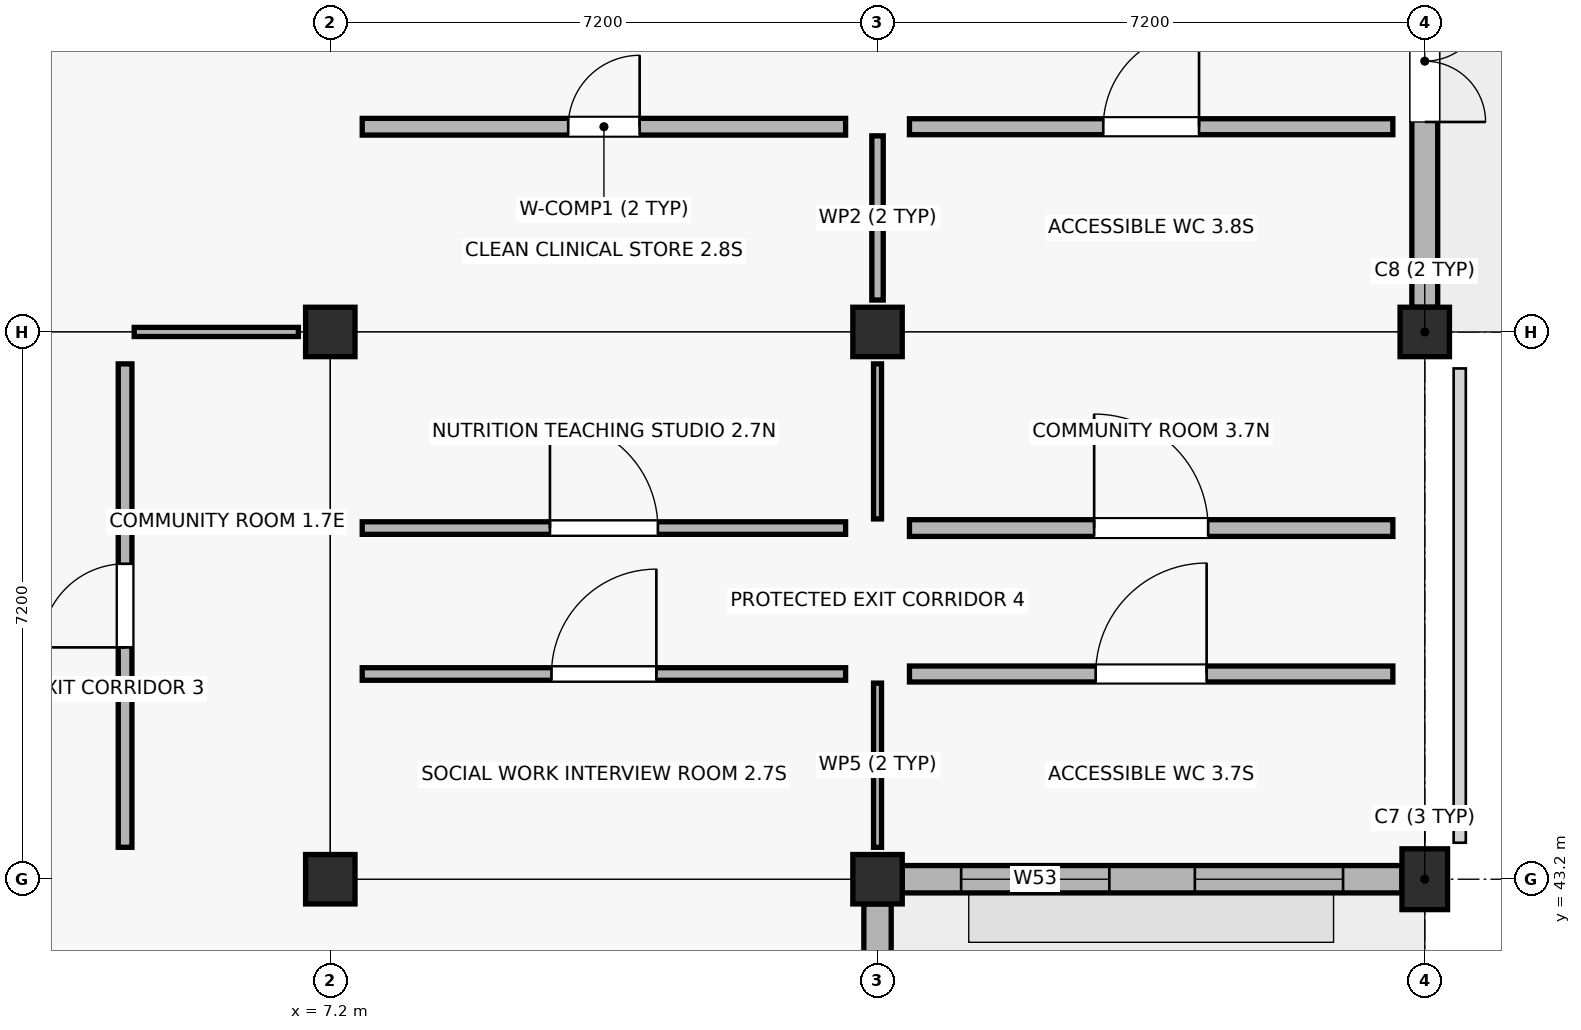
"""IFC4 building model, lengths in metres.
Left out: names, types, materials, properties, quantities, classifications, styles, units other than length and angle.
Written with IfcOpenShell. Run it as: python <this file> out.ifc"""

import sys

from ifc_helpers import new_model, si_unit, direction, frame, frame_2d, origin, origin_2d, place, context, subcontext, project, spatial, rectangle, circle, extrude, element, fill, save


model = new_model("IFC4")
c1 = context("Model", 3, precision=1e-05, world=origin(), true_north=direction((0.0, 1.0)))
c2 = subcontext(c1, "Body", "Model", "MODEL_VIEW")
j1 = project(units=[si_unit("LENGTHUNIT", "METRE"), si_unit("PLANEANGLEUNIT", "RADIAN")], contexts=[c1])
p1 = place(None, origin())
s1 = spatial("IfcSite", under=j1, at=p1, CompositionType="ELEMENT")
p2 = place(p1, origin())
s2 = spatial("IfcBuilding", under=s1, at=p2, CompositionType="ELEMENT")
p3 = place(p2, origin())
s3 = spatial("IfcBuildingStorey", under=s2, at=p3, CompositionType="ELEMENT", Elevation=0.0)
for number, where, z_axis, x_axis in (
    (1, (7.2, 43.2, -0.25), (0.0, 0.0, 1.0), (1.0, 0.0, 0.0)),
    (2, (7.2, 50.4, -0.25), (0.0, 0.0, 1.0), (1.0, 0.0, 0.0)),
    (3, (14.4, 43.2, -0.25), (0.0, 0.0, 1.0), (1.0, 0.0, 0.0)),
    (4, (14.4, 50.4, -0.25), (0.0, 0.0, 1.0), (1.0, 0.0, 0.0)),
):
    element("IfcColumn", number, at=place(p3, frame(where, z_axis=z_axis, x_axis=x_axis)), inside=s3, PredefinedType="COLUMN", context=c2, shape_type="SweptSolid", body=[
        extrude(rectangle(XDim=0.65, YDim=0.65, at=origin_2d()), origin(), (0.0, 0.0, 1.0), 4.75),
    ])
p4 = place(p3, frame((21.6, 43.2, -0.25), z_axis=(0.0, 0.0, 1.0), x_axis=(1.0, 0.0, 0.0)))
e5 = element("IfcColumn", 5, at=p4, inside=s3, PredefinedType="PILASTER", context=c2, shape_type="SweptSolid", body=[
    extrude(rectangle(XDim=0.6, YDim=0.8, at=origin_2d()), origin(), (0.0, 0.0, 1.0), 4.75),
])
p5 = place(p3, frame((21.6, 50.4, -0.25), z_axis=(0.0, 0.0, 1.0), x_axis=(1.0, 0.0, 0.0)))
e6 = element("IfcColumn", 6, at=p5, inside=s3, PredefinedType="COLUMN", context=c2, shape_type="SweptSolid", body=[
    extrude(circle(Radius=0.325, at=origin_2d()), origin(), (0.0, 0.0, 1.0), 4.75),
])
p6 = place(p3, frame((14.4, 36.325, 0.0), z_axis=(0.0, 0.0, 1.0), x_axis=(0.0, 1.0, 0.0)))
e7 = element("IfcWall", 7, at=p6, inside=s3, PredefinedType="SOLIDWALL", context=c2, shape_type="SweptSolid", body=[
    extrude(rectangle(XDim=6.55, YDim=0.36, at=frame_2d((3.275, 0.0))), origin(), (0.0, 0.0, 1.0), 3.52),
])
p7 = place(p6, frame((1.0, 0.0, 0.9)))
e8 = element("IfcOpeningElement", 8, at=p7, cuts=e7, PredefinedType="OPENING", context=c2, shape_type="SweptSolid", body=[
    extrude(rectangle(XDim=1.5, YDim=1.75, at=frame_2d((0.75, 0.875))), frame((0.0, 0.19, 0.0), z_axis=(0.0, -1.0, 0.0), x_axis=(1.0, 0.0, 0.0)), (0.0, 0.0, 1.0), 0.38),
])
p8 = place(p6, frame((4.05, 0.0, 0.9)))
e9 = element("IfcOpeningElement", 9, at=p8, cuts=e7, PredefinedType="OPENING", context=c2, shape_type="SweptSolid", body=[
    extrude(rectangle(XDim=1.5, YDim=1.75, at=frame_2d((0.75, 0.875))), frame((0.0, 0.19, 0.0), z_axis=(0.0, -1.0, 0.0), x_axis=(1.0, 0.0, 0.0)), (0.0, 0.0, 1.0), 0.38),
])
p9 = place(p3, frame((14.725, 43.2, 0.0), z_axis=(0.0, 0.0, 1.0), x_axis=(1.0, 0.0, 0.0)))
e10 = element("IfcWall", 10, at=p9, inside=s3, PredefinedType="SOLIDWALL", context=c2, shape_type="SweptSolid", body=[
    extrude(rectangle(XDim=6.575, YDim=0.36, at=frame_2d((3.288, 0.0))), origin(), (0.0, 0.0, 1.0), 3.47),
])
p10 = place(p9, frame((0.775, 0.0, 0.9)))
e11 = element("IfcOpeningElement", 11, at=p10, cuts=e10, PredefinedType="OPENING", context=c2, shape_type="SweptSolid", body=[
    extrude(rectangle(XDim=1.95, YDim=1.88, at=frame_2d((0.975, 0.94))), frame((0.0, 0.19, 0.0), z_axis=(0.0, -1.0, 0.0), x_axis=(1.0, 0.0, 0.0)), (0.0, 0.0, 1.0), 0.38),
])
p11 = place(p9, frame((3.85, 0.0, 0.9)))
e12 = element("IfcOpeningElement", 12, at=p11, cuts=e10, PredefinedType="OPENING", context=c2, shape_type="SweptSolid", body=[
    extrude(rectangle(XDim=1.95, YDim=1.88, at=frame_2d((0.975, 0.94))), frame((0.0, 0.19, 0.0), z_axis=(0.0, -1.0, 0.0), x_axis=(1.0, 0.0, 0.0)), (0.0, 0.0, 1.0), 0.38),
])
p12 = place(p3, frame((21.6, 57.2, 0.0), z_axis=(0.0, 0.0, 1.0), x_axis=(0.0, -1.0, 0.0)))
e13 = element("IfcWall", 13, at=p12, inside=s3, PredefinedType="SOLIDWALL", context=c2, shape_type="SweptSolid", body=[
    extrude(rectangle(XDim=6.475, YDim=0.34, at=frame_2d((3.237, 0.0))), origin(), (0.0, 0.0, 1.0), 3.52),
])
p13 = place(p12, frame((2.438, 0.0, 0.0)))
e14 = element("IfcOpeningElement", 14, at=p13, cuts=e13, PredefinedType="OPENING", context=c2, shape_type="SweptSolid", body=[
    extrude(rectangle(XDim=1.6, YDim=2.25, at=frame_2d((0.8, 1.125))), frame((0.0, 0.18, 0.0), z_axis=(0.0, -1.0, 0.0), x_axis=(1.0, 0.0, 0.0)), (0.0, 0.0, 1.0), 0.36),
])
p14 = place(p3, frame((7.62, 53.1, 0.0), z_axis=(0.0, 0.0, 1.0), x_axis=(1.0, 0.0, 0.0)))
e15 = element("IfcWall", 15, at=p14, inside=s3, PredefinedType="SOLIDWALL", context=c2, shape_type="SweptSolid", body=[
    extrude(rectangle(XDim=6.36, YDim=0.22, at=frame_2d((3.18, 0.0))), origin(), (0.0, 0.0, 1.0), 3.36),
])
p15 = place(p14, frame((2.71, 0.0, 0.0)))
e16 = element("IfcOpeningElement", 16, at=p15, cuts=e15, PredefinedType="OPENING", context=c2, shape_type="SweptSolid", body=[
    extrude(rectangle(XDim=0.94, YDim=2.09, at=frame_2d((0.47, 1.045))), frame((0.0, 0.12, 0.0), z_axis=(0.0, -1.0, 0.0), x_axis=(1.0, 0.0, 0.0)), (0.0, 0.0, 1.0), 0.24),
])
p16 = place(p3, frame((14.4, 50.82, 0.0), z_axis=(0.0, 0.0, 1.0), x_axis=(0.0, 1.0, 0.0)))
e17 = element("IfcWall", 17, at=p16, inside=s3, PredefinedType="PARTITIONING", context=c2, shape_type="SweptSolid", body=[
    extrude(rectangle(XDim=2.16, YDim=0.15, at=frame_2d((1.08, 0.0))), origin(), (0.0, 0.0, 1.0), 3.36),
])
p17 = place(p3, frame((14.82, 53.1, 0.0), z_axis=(0.0, 0.0, 1.0), x_axis=(1.0, 0.0, 0.0)))
e18 = element("IfcWall", 18, at=p17, inside=s3, PredefinedType="PLUMBINGWALL", context=c2, shape_type="SweptSolid", body=[
    extrude(rectangle(XDim=6.36, YDim=0.21, at=frame_2d((3.18, 0.0))), origin(), (0.0, 0.0, 1.0), 3.36),
])
p18 = place(p17, frame((2.55, 0.0, 0.0)))
e19 = element("IfcOpeningElement", 19, at=p18, cuts=e18, PredefinedType="OPENING", context=c2, shape_type="SweptSolid", body=[
    extrude(rectangle(XDim=1.26, YDim=2.09, at=frame_2d((0.63, 1.045))), frame((0.0, 0.115, 0.0), z_axis=(0.0, -1.0, 0.0), x_axis=(1.0, 0.0, 0.0)), (0.0, 0.0, 1.0), 0.23),
])
p19 = place(p3, frame((4.5, 43.62, 0.0), z_axis=(0.0, 0.0, 1.0), x_axis=(0.0, 1.0, 0.0)))
e20 = element("IfcWall", 20, at=p19, inside=s3, PredefinedType="PARTITIONING", context=c2, shape_type="SweptSolid", body=[
    extrude(rectangle(XDim=6.36, YDim=0.18, at=frame_2d((3.18, 0.0))), origin(), (0.0, 0.0, 1.0), 3.36),
])
p20 = place(p19, frame((2.63, 0.0, 0.0)))
e21 = element("IfcOpeningElement", 21, at=p20, cuts=e20, PredefinedType="OPENING", context=c2, shape_type="SweptSolid", body=[
    extrude(rectangle(XDim=1.1, YDim=2.09, at=frame_2d((0.55, 1.045))), frame((0.0, 0.1, 0.0), z_axis=(0.0, -1.0, 0.0), x_axis=(1.0, 0.0, 0.0)), (0.0, 0.0, 1.0), 0.2),
])
p21 = place(p3, frame((4.62, 50.4, 0.0), z_axis=(0.0, 0.0, 1.0), x_axis=(1.0, 0.0, 0.0)))
e22 = element("IfcWall", 22, at=p21, inside=s3, PredefinedType="PARTITIONING", context=c2, shape_type="SweptSolid", body=[
    extrude(rectangle(XDim=2.16, YDim=0.12, at=frame_2d((1.08, 0.0))), origin(), (0.0, 0.0, 1.0), 3.36),
])
p22 = place(p3, frame((7.62, 45.9, 0.0), z_axis=(0.0, 0.0, 1.0), x_axis=(1.0, 0.0, 0.0)))
e23 = element("IfcWall", 23, at=p22, inside=s3, PredefinedType="PARTITIONING", context=c2, shape_type="SweptSolid", body=[
    extrude(rectangle(XDim=6.36, YDim=0.165, at=frame_2d((3.18, 0.0))), origin(), (0.0, 0.0, 1.0), 3.36),
])
p23 = place(p22, frame((2.49, 0.0, 0.0)))
e24 = element("IfcOpeningElement", 24, at=p23, cuts=e23, PredefinedType="OPENING", context=c2, shape_type="SweptSolid", body=[
    extrude(rectangle(XDim=1.38, YDim=2.09, at=frame_2d((0.69, 1.045))), frame((0.0, 0.093, 0.0), z_axis=(0.0, -1.0, 0.0), x_axis=(1.0, 0.0, 0.0)), (0.0, 0.0, 1.0), 0.185),
])
p24 = place(p3, frame((14.4, 43.62, 0.0), z_axis=(0.0, 0.0, 1.0), x_axis=(0.0, 1.0, 0.0)))
e25 = element("IfcWall", 25, at=p24, inside=s3, PredefinedType="PARTITIONING", context=c2, shape_type="SweptSolid", body=[
    extrude(rectangle(XDim=2.16, YDim=0.105, at=frame_2d((1.08, 0.0))), origin(), (0.0, 0.0, 1.0), 3.36),
])
p25 = place(p3, frame((7.62, 47.82, 0.0), z_axis=(0.0, 0.0, 1.0), x_axis=(1.0, 0.0, 0.0)))
e26 = element("IfcWall", 26, at=p25, inside=s3, PredefinedType="PARTITIONING", context=c2, shape_type="SweptSolid", body=[
    extrude(rectangle(XDim=6.36, YDim=0.165, at=frame_2d((3.18, 0.0))), origin(), (0.0, 0.0, 1.0), 3.36),
])
p26 = place(p25, frame((2.47, 0.0, 0.0)))
e27 = element("IfcOpeningElement", 27, at=p26, cuts=e26, PredefinedType="OPENING", context=c2, shape_type="SweptSolid", body=[
    extrude(rectangle(XDim=1.42, YDim=2.09, at=frame_2d((0.71, 1.045))), frame((0.0, 0.093, 0.0), z_axis=(0.0, -1.0, 0.0), x_axis=(1.0, 0.0, 0.0)), (0.0, 0.0, 1.0), 0.185),
])
p27 = place(p3, frame((14.4, 47.94, 0.0), z_axis=(0.0, 0.0, 1.0), x_axis=(0.0, 1.0, 0.0)))
e28 = element("IfcWall", 28, at=p27, inside=s3, PredefinedType="PARTITIONING", context=c2, shape_type="SweptSolid", body=[
    extrude(rectangle(XDim=2.04, YDim=0.105, at=frame_2d((1.02, 0.0))), origin(), (0.0, 0.0, 1.0), 3.36),
])
p28 = place(p3, frame((14.82, 45.9, 0.0), z_axis=(0.0, 0.0, 1.0), x_axis=(1.0, 0.0, 0.0)))
e29 = element("IfcWall", 29, at=p28, inside=s3, PredefinedType="PLUMBINGWALL", context=c2, shape_type="SweptSolid", body=[
    extrude(rectangle(XDim=6.36, YDim=0.21, at=frame_2d((3.18, 0.0))), origin(), (0.0, 0.0, 1.0), 3.36),
])
p29 = place(p28, frame((2.45, 0.0, 0.0)))
e30 = element("IfcOpeningElement", 30, at=p29, cuts=e29, PredefinedType="OPENING", context=c2, shape_type="SweptSolid", body=[
    extrude(rectangle(XDim=1.46, YDim=2.09, at=frame_2d((0.73, 1.045))), frame((0.0, 0.115, 0.0), z_axis=(0.0, -1.0, 0.0), x_axis=(1.0, 0.0, 0.0)), (0.0, 0.0, 1.0), 0.23),
])
p30 = place(p3, frame((14.82, 47.82, 0.0), z_axis=(0.0, 0.0, 1.0), x_axis=(1.0, 0.0, 0.0)))
e31 = element("IfcWall", 31, at=p30, inside=s3, PredefinedType="SOLIDWALL", context=c2, shape_type="SweptSolid", body=[
    extrude(rectangle(XDim=6.36, YDim=0.22, at=frame_2d((3.18, 0.0))), origin(), (0.0, 0.0, 1.0), 3.36),
])
p31 = place(p30, frame((2.43, 0.0, 0.0)))
e32 = element("IfcOpeningElement", 32, at=p31, cuts=e31, PredefinedType="OPENING", context=c2, shape_type="SweptSolid", body=[
    extrude(rectangle(XDim=1.5, YDim=2.09, at=frame_2d((0.75, 1.045))), frame((0.0, 0.12, 0.0), z_axis=(0.0, -1.0, 0.0), x_axis=(1.0, 0.0, 0.0)), (0.0, 0.0, 1.0), 0.24),
])
p32 = place(p10, origin())
e33 = element("IfcWindow", 33, at=p32, inside=s3, PartitioningType="SINGLE_PANEL", PredefinedType="WINDOW", context=c2, shape_type="SweptSolid", body=[
    extrude(rectangle(XDim=1.95, YDim=1.88, at=frame_2d((0.975, 0.94))), frame((0.0, 0.03, 0.0), z_axis=(0.0, -1.0, 0.0), x_axis=(1.0, 0.0, 0.0)), (0.0, 0.0, 1.0), 0.06),
])
fill(e11, e33)
p33 = place(p11, origin())
e34 = element("IfcWindow", 34, at=p33, inside=s3, PartitioningType="SINGLE_PANEL", PredefinedType="WINDOW", context=c2, shape_type="SweptSolid", body=[
    extrude(rectangle(XDim=1.95, YDim=1.88, at=frame_2d((0.975, 0.94))), frame((0.0, 0.03, 0.0), z_axis=(0.0, -1.0, 0.0), x_axis=(1.0, 0.0, 0.0)), (0.0, 0.0, 1.0), 0.06),
])
fill(e12, e34)
p34 = place(p13, origin())
e35 = element("IfcDoor", 35, at=p34, inside=s3, OperationType="DOUBLE_DOOR_SINGLE_SWING", PredefinedType="DOOR", context=c2, shape_type="SweptSolid", body=[
    extrude(rectangle(XDim=1.6, YDim=2.25, at=frame_2d((0.8, 1.125))), frame((0.0, 0.025, 0.0), z_axis=(0.0, -1.0, 0.0), x_axis=(1.0, 0.0, 0.0)), (0.0, 0.0, 1.0), 0.05),
])
fill(e14, e35)
p35 = place(p15, origin())
e36 = element("IfcDoor", 36, at=p35, inside=s3, OperationType="SINGLE_SWING_RIGHT", PredefinedType="DOOR", context=c2, shape_type="SweptSolid", body=[
    extrude(rectangle(XDim=0.94, YDim=2.09, at=frame_2d((0.47, 1.045))), frame((0.0, 0.025, 0.0), z_axis=(0.0, -1.0, 0.0), x_axis=(1.0, 0.0, 0.0)), (0.0, 0.0, 1.0), 0.05),
])
fill(e16, e36)
p36 = place(p18, origin())
e37 = element("IfcDoor", 37, at=p36, inside=s3, OperationType="SINGLE_SWING_RIGHT", PredefinedType="DOOR", context=c2, shape_type="SweptSolid", body=[
    extrude(rectangle(XDim=1.26, YDim=2.09, at=frame_2d((0.63, 1.045))), frame((0.0, 0.025, 0.0), z_axis=(0.0, -1.0, 0.0), x_axis=(1.0, 0.0, 0.0)), (0.0, 0.0, 1.0), 0.05),
])
fill(e19, e37)
p37 = place(p20, origin())
e38 = element("IfcDoor", 38, at=p37, inside=s3, OperationType="SINGLE_SWING_LEFT", PredefinedType="DOOR", context=c2, shape_type="SweptSolid", body=[
    extrude(rectangle(XDim=1.1, YDim=2.09, at=frame_2d((0.55, 1.045))), frame((0.0, 0.025, 0.0), z_axis=(0.0, -1.0, 0.0), x_axis=(1.0, 0.0, 0.0)), (0.0, 0.0, 1.0), 0.05),
])
fill(e21, e38)
p38 = place(p23, origin())
e39 = element("IfcDoor", 39, at=p38, inside=s3, OperationType="SINGLE_SWING_RIGHT", PredefinedType="DOOR", context=c2, shape_type="SweptSolid", body=[
    extrude(rectangle(XDim=1.38, YDim=2.09, at=frame_2d((0.69, 1.045))), frame((0.0, 0.025, 0.0), z_axis=(0.0, -1.0, 0.0), x_axis=(1.0, 0.0, 0.0)), (0.0, 0.0, 1.0), 0.05),
])
fill(e24, e39)
p39 = place(p26, origin())
e40 = element("IfcDoor", 40, at=p39, inside=s3, OperationType="SINGLE_SWING_LEFT", PredefinedType="DOOR", context=c2, shape_type="SweptSolid", body=[
    extrude(rectangle(XDim=1.42, YDim=2.09, at=frame_2d((0.71, 1.045))), frame((0.0, 0.025, 0.0), z_axis=(0.0, -1.0, 0.0), x_axis=(1.0, 0.0, 0.0)), (0.0, 0.0, 1.0), 0.05),
])
fill(e27, e40)
p40 = place(p29, origin())
e41 = element("IfcDoor", 41, at=p40, inside=s3, OperationType="SINGLE_SWING_RIGHT", PredefinedType="DOOR", context=c2, shape_type="SweptSolid", body=[
    extrude(rectangle(XDim=1.46, YDim=2.09, at=frame_2d((0.73, 1.045))), frame((0.0, 0.025, 0.0), z_axis=(0.0, -1.0, 0.0), x_axis=(1.0, 0.0, 0.0)), (0.0, 0.0, 1.0), 0.05),
])
fill(e30, e41)
p41 = place(p31, origin())
e42 = element("IfcDoor", 42, at=p41, inside=s3, OperationType="SINGLE_SWING_LEFT", PredefinedType="DOOR", context=c2, shape_type="SweptSolid", body=[
    extrude(rectangle(XDim=1.5, YDim=2.09, at=frame_2d((0.75, 1.045))), frame((0.0, 0.025, 0.0), z_axis=(0.0, -1.0, 0.0), x_axis=(1.0, 0.0, 0.0)), (0.0, 0.0, 1.0), 0.05),
])
fill(e32, e42)
save(model, sys.argv[1])
